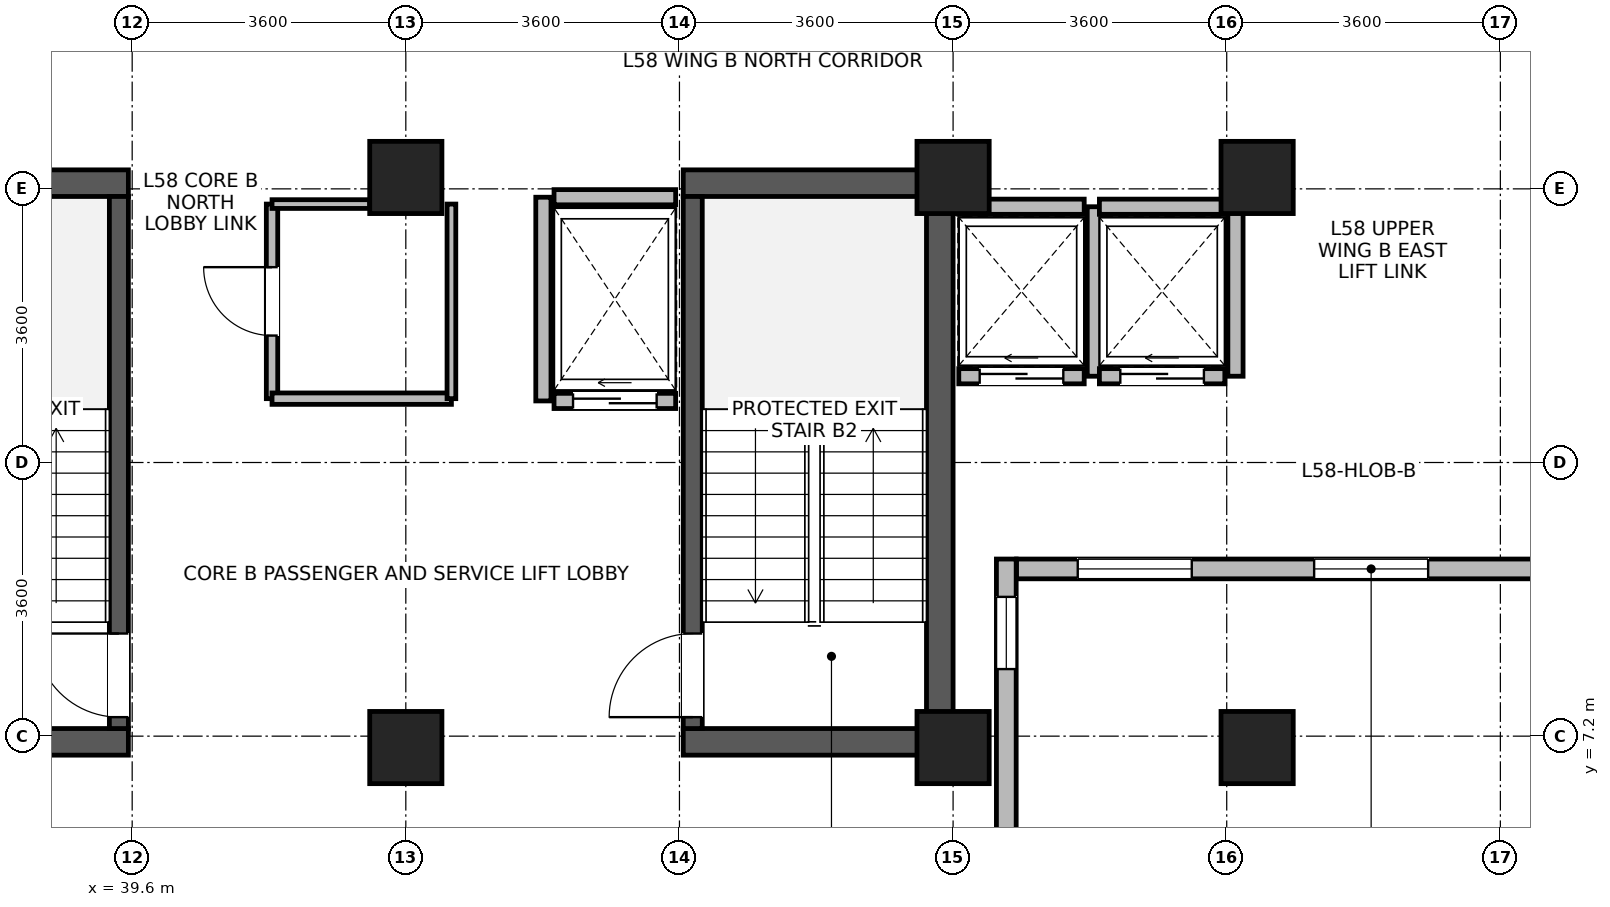
"""IFC4 building model, lengths in metres.
Left out: names, types, materials, properties, quantities, classifications, styles, units other than length and angle.
Written with IfcOpenShell. Run it as: python <this file> out.ifc"""

import sys

from ifc_helpers import new_model, si_unit, direction, frame, frame_2d, origin, origin_2d, place, context, subcontext, project, spatial, rectangle, extrude, source, transform, mapped, element, fill, save


model = new_model("IFC4")
c1 = context("Model", 3, precision=1e-05, world=origin(), true_north=direction((0.0, 1.0)))
c2 = subcontext(c1, "Body", "Model", "MODEL_VIEW")
j1 = project(units=[si_unit("LENGTHUNIT", "METRE"), si_unit("PLANEANGLEUNIT", "RADIAN")], contexts=[c1])
p1 = place(None, origin())
s1 = spatial("IfcSite", under=j1, at=p1, CompositionType="ELEMENT")
p2 = place(p1, origin())
s2 = spatial("IfcBuilding", under=s1, at=p2, CompositionType="ELEMENT")
p3 = place(p2, frame((0.0, 0.0, 227.7)))
s3 = spatial("IfcBuildingStorey", under=s2, at=p3, CompositionType="ELEMENT", Elevation=227.7)
p4 = place(p3, frame((50.225, 6.95, 0.0), z_axis=(0.0, 0.0, 1.0), x_axis=(0.0, 1.0, 0.0)))
e1 = element("IfcWall", 1, at=p4, inside=s3, PredefinedType="SHEAR", context=c2, shape_type="SweptSolid", body=[
    extrude(rectangle(XDim=7.7, YDim=0.35, at=frame_2d((3.85, 0.0))), origin(), (0.0, 0.0, 1.0), 3.47),
])
for number, where, z_axis, x_axis in (
    (2, (36.35, 7.125, 0.0), (0.0, 0.0, 1.0), (1.0, 0.0, 0.0)),
    (3, (46.85, 7.125, 0.0), (0.0, 0.0, 1.0), (1.0, 0.0, 0.0)),
    (4, (36.35, 14.475, 0.0), (0.0, 0.0, 1.0), (1.0, 0.0, 0.0)),
    (5, (46.85, 14.475, 0.0), (0.0, 0.0, 1.0), (1.0, 0.0, 0.0)),
):
    element("IfcWall", number, at=place(p3, frame(where, z_axis=z_axis, x_axis=x_axis)), inside=s3, PredefinedType="SHEAR", context=c2, shape_type="SweptSolid", body=[
        extrude(rectangle(XDim=3.2, YDim=0.35, at=frame_2d((1.6, 0.0))), origin(), (0.0, 0.0, 1.0), 3.47),
    ])
p5 = place(p3, frame((39.425, 7.3, 0.0), z_axis=(0.0, 0.0, 1.0), x_axis=(0.0, 1.0, 0.0)))
e6 = element("IfcWall", 6, at=p5, inside=s3, PredefinedType="SHEAR", context=c2, shape_type="SweptSolid", body=[
    extrude(rectangle(XDim=7.0, YDim=0.25, at=frame_2d((3.5, 0.0))), origin(), (0.0, 0.0, 1.0), 3.47),
])
p6 = place(p5, frame((0.15, 0.0, 0.0)))
e7 = element("IfcOpeningElement", 7, at=p6, cuts=e6, PredefinedType="OPENING", context=c2, shape_type="SweptSolid", body=[
    extrude(rectangle(XDim=1.1, YDim=2.08, at=frame_2d((0.55, 1.04))), frame((0.0, 0.135, 0.0), z_axis=(0.0, -1.0, 0.0), x_axis=(1.0, 0.0, 0.0)), (0.0, 0.0, 1.0), 0.27),
])
p7 = place(p3, frame((46.975, 7.3, 0.0), z_axis=(0.0, 0.0, 1.0), x_axis=(0.0, 1.0, 0.0)))
e8 = element("IfcWall", 8, at=p7, inside=s3, PredefinedType="SHEAR", context=c2, shape_type="SweptSolid", body=[
    extrude(rectangle(XDim=7.0, YDim=0.25, at=frame_2d((3.5, 0.0))), origin(), (0.0, 0.0, 1.0), 3.47),
])
p8 = place(p7, frame((0.15, 0.0, 0.0)))
e9 = element("IfcOpeningElement", 9, at=p8, cuts=e8, PredefinedType="OPENING", context=c2, shape_type="SweptSolid", body=[
    extrude(rectangle(XDim=1.1, YDim=2.08, at=frame_2d((0.55, 1.04))), frame((0.0, 0.135, 0.0), z_axis=(0.0, -1.0, 0.0), x_axis=(1.0, 0.0, 0.0)), (0.0, 0.0, 1.0), 0.27),
])
m1 = source(origin(), c2, "Body", "SweptSolid", [
    extrude(rectangle(XDim=0.95, YDim=0.95, at=origin_2d()), origin(), (0.0, 0.0, 1.0), 3.7),
])
for number, where, z_axis, x_axis in (
    (10, (43.2, 7.05, 0.0), (0.0, 0.0, 1.0), (1.0, 0.0, 0.0)),
    (11, (43.2, 14.55, 0.0), (0.0, 0.0, 1.0), (1.0, 0.0, 0.0)),
    (12, (50.4, 7.05, 0.0), (0.0, 0.0, 1.0), (1.0, 0.0, 0.0)),
    (13, (50.4, 14.55, 0.0), (0.0, 0.0, 1.0), (1.0, 0.0, 0.0)),
    (14, (54.4, 7.05, 0.0), (0.0, 0.0, 1.0), (1.0, 0.0, 0.0)),
    (15, (54.4, 14.55, 0.0), (0.0, 0.0, 1.0), (1.0, 0.0, 0.0)),
):
    element("IfcColumn", number, at=place(p3, frame(where, z_axis=z_axis, x_axis=x_axis)), inside=s3, PredefinedType="COLUMN", context=c2, shape_type="MappedRepresentation", body=[
        mapped(m1, transform((0.0, 0.0, 0.0), x_axis=(1.0, 0.0, 0.0), y_axis=(0.0, 1.0, 0.0), z_axis=(0.0, 0.0, 1.0), scale=1.0)),
    ])
p9 = place(p3, frame((51.1, 9.53, 0.0), z_axis=(0.0, 0.0, 1.0), x_axis=(0.0, -1.0, 0.0)))
e16 = element("IfcWall", 16, at=p9, inside=s3, PredefinedType="STANDARD", context=c2, shape_type="SweptSolid", body=[
    extrude(rectangle(XDim=3.86, YDim=0.26, at=frame_2d((1.93, 0.0))), origin(), (0.0, 0.0, 1.0), 3.45),
])
p10 = place(p9, frame((0.498, 0.0, 0.85)))
e17 = element("IfcOpeningElement", 17, at=p10, cuts=e16, PredefinedType="OPENING", context=c2, shape_type="SweptSolid", body=[
    extrude(rectangle(XDim=0.95, YDim=1.75, at=frame_2d((0.475, 0.875))), frame((0.0, 0.14, 0.0), z_axis=(0.0, -1.0, 0.0), x_axis=(1.0, 0.0, 0.0)), (0.0, 0.0, 1.0), 0.28),
])
p11 = place(p3, frame((60.565, 9.4, 0.0), z_axis=(0.0, 0.0, 1.0), x_axis=(-1.0, 0.0, 0.0)))
e18 = element("IfcWall", 18, at=p11, inside=s3, PredefinedType="STANDARD", context=c2, shape_type="SweptSolid", body=[
    extrude(rectangle(XDim=9.33, YDim=0.26, at=frame_2d((4.665, 0.0))), origin(), (0.0, 0.0, 1.0), 3.45),
])
p12 = place(p11, frame((0.805, 0.0, 0.85)))
e19 = element("IfcOpeningElement", 19, at=p12, cuts=e18, PredefinedType="OPENING", context=c2, shape_type="SweptSolid", body=[
    extrude(rectangle(XDim=1.5, YDim=1.85, at=frame_2d((0.75, 0.925))), frame((0.0, 0.14, 0.0), z_axis=(0.0, -1.0, 0.0), x_axis=(1.0, 0.0, 0.0)), (0.0, 0.0, 1.0), 0.28),
])
p13 = place(p11, frame((3.915, 0.0, 0.85)))
e20 = element("IfcOpeningElement", 20, at=p13, cuts=e18, PredefinedType="OPENING", context=c2, shape_type="SweptSolid", body=[
    extrude(rectangle(XDim=1.5, YDim=1.85, at=frame_2d((0.75, 0.925))), frame((0.0, 0.14, 0.0), z_axis=(0.0, -1.0, 0.0), x_axis=(1.0, 0.0, 0.0)), (0.0, 0.0, 1.0), 0.28),
])
p14 = place(p11, frame((7.025, 0.0, 0.85)))
e21 = element("IfcOpeningElement", 21, at=p14, cuts=e18, PredefinedType="OPENING", context=c2, shape_type="SweptSolid", body=[
    extrude(rectangle(XDim=1.5, YDim=1.85, at=frame_2d((0.75, 0.925))), frame((0.0, 0.14, 0.0), z_axis=(0.0, -1.0, 0.0), x_axis=(1.0, 0.0, 0.0)), (0.0, 0.0, 1.0), 0.28),
])
p15 = place(p3, frame((50.475, 11.935, 0.0), z_axis=(0.0, 0.0, 1.0), x_axis=(1.0, 0.0, 0.0)))
e22 = element("IfcWall", 22, at=p15, inside=s3, PredefinedType="PARTITIONING", context=c2, shape_type="SweptSolid", body=[
    extrude(rectangle(XDim=1.65, YDim=0.2, at=frame_2d((0.825, 0.0))), origin(), (0.0, 0.0, 1.0), 3.45),
])
p16 = place(p15, frame((0.275, 0.0, 0.0)))
e23 = element("IfcOpeningElement", 23, at=p16, cuts=e22, PredefinedType="OPENING", context=c2, shape_type="SweptSolid", body=[
    extrude(rectangle(XDim=1.1, YDim=2.12, at=frame_2d((0.55, 1.06))), frame((0.0, 0.11, 0.0), z_axis=(0.0, -1.0, 0.0), x_axis=(1.0, 0.0, 0.0)), (0.0, 0.0, 1.0), 0.22),
])
p17 = place(p3, frame((50.475, 14.165, 0.0), z_axis=(0.0, 0.0, 1.0), x_axis=(1.0, 0.0, 0.0)))
e24 = element("IfcWall", 24, at=p17, inside=s3, PredefinedType="PARTITIONING", context=c2, shape_type="SweptSolid", body=[
    extrude(rectangle(XDim=1.65, YDim=0.2, at=frame_2d((0.825, 0.0))), origin(), (0.0, 0.0, 1.0), 3.45),
])
p18 = place(p3, frame((52.265, 11.935, 0.0), z_axis=(0.0, 0.0, 1.0), x_axis=(0.0, 1.0, 0.0)))
e25 = element("IfcWall", 25, at=p18, inside=s3, PredefinedType="PARTITIONING", context=c2, shape_type="SweptSolid", body=[
    extrude(rectangle(XDim=2.23, YDim=0.2, at=frame_2d((1.115, 0.0))), origin(), (0.0, 0.0, 1.0), 3.45),
])
p19 = place(p3, frame((52.325, 11.935, 0.0), z_axis=(0.0, 0.0, 1.0), x_axis=(1.0, 0.0, 0.0)))
e26 = element("IfcWall", 26, at=p19, inside=s3, PredefinedType="PARTITIONING", context=c2, shape_type="SweptSolid", body=[
    extrude(rectangle(XDim=1.65, YDim=0.2, at=frame_2d((0.825, 0.0))), origin(), (0.0, 0.0, 1.0), 3.45),
])
p20 = place(p19, frame((0.275, 0.0, 0.0)))
e27 = element("IfcOpeningElement", 27, at=p20, cuts=e26, PredefinedType="OPENING", context=c2, shape_type="SweptSolid", body=[
    extrude(rectangle(XDim=1.1, YDim=2.12, at=frame_2d((0.55, 1.06))), frame((0.0, 0.11, 0.0), z_axis=(0.0, -1.0, 0.0), x_axis=(1.0, 0.0, 0.0)), (0.0, 0.0, 1.0), 0.22),
])
p21 = place(p3, frame((52.325, 14.165, 0.0), z_axis=(0.0, 0.0, 1.0), x_axis=(1.0, 0.0, 0.0)))
e28 = element("IfcWall", 28, at=p21, inside=s3, PredefinedType="PARTITIONING", context=c2, shape_type="SweptSolid", body=[
    extrude(rectangle(XDim=1.65, YDim=0.2, at=frame_2d((0.825, 0.0))), origin(), (0.0, 0.0, 1.0), 3.45),
])
p22 = place(p3, frame((54.115, 11.935, 0.0), z_axis=(0.0, 0.0, 1.0), x_axis=(0.0, 1.0, 0.0)))
e29 = element("IfcWall", 29, at=p22, inside=s3, PredefinedType="PARTITIONING", context=c2, shape_type="SweptSolid", body=[
    extrude(rectangle(XDim=2.23, YDim=0.2, at=frame_2d((1.115, 0.0))), origin(), (0.0, 0.0, 1.0), 3.45),
])
p23 = place(p3, frame((45.15, 11.61, 0.0), z_axis=(0.0, 0.0, 1.0), x_axis=(1.0, 0.0, 0.0)))
e30 = element("IfcWall", 30, at=p23, inside=s3, PredefinedType="PARTITIONING", context=c2, shape_type="SweptSolid", body=[
    extrude(rectangle(XDim=1.6, YDim=0.2, at=frame_2d((0.8, 0.0))), origin(), (0.0, 0.0, 1.0), 3.45),
])
p24 = place(p23, frame((0.25, 0.0, 0.0)))
e31 = element("IfcOpeningElement", 31, at=p24, cuts=e30, PredefinedType="OPENING", context=c2, shape_type="SweptSolid", body=[
    extrude(rectangle(XDim=1.1, YDim=2.12, at=frame_2d((0.55, 1.06))), frame((0.0, 0.11, 0.0), z_axis=(0.0, -1.0, 0.0), x_axis=(1.0, 0.0, 0.0)), (0.0, 0.0, 1.0), 0.22),
])
p25 = place(p3, frame((45.15, 14.29, 0.0), z_axis=(0.0, 0.0, 1.0), x_axis=(1.0, 0.0, 0.0)))
e32 = element("IfcWall", 32, at=p25, inside=s3, PredefinedType="PARTITIONING", context=c2, shape_type="SweptSolid", body=[
    extrude(rectangle(XDim=1.6, YDim=0.2, at=frame_2d((0.8, 0.0))), origin(), (0.0, 0.0, 1.0), 2.55),
])
p26 = place(p3, frame((45.01, 11.61, 0.0), z_axis=(0.0, 0.0, 1.0), x_axis=(0.0, 1.0, 0.0)))
e33 = element("IfcWall", 33, at=p26, inside=s3, PredefinedType="PARTITIONING", context=c2, shape_type="SweptSolid", body=[
    extrude(rectangle(XDim=2.68, YDim=0.2, at=frame_2d((1.34, 0.0))), origin(), (0.0, 0.0, 1.0), 3.45),
])
p27 = place(p3, frame((41.44, 11.64, 0.0), z_axis=(0.0, 0.0, 1.0), x_axis=(0.0, 1.0, 0.0)))
e34 = element("IfcWall", 34, at=p27, inside=s3, PredefinedType="PARTITIONING", context=c2, shape_type="SweptSolid", body=[
    extrude(rectangle(XDim=2.56, YDim=0.15, at=frame_2d((1.28, 0.0))), origin(), (0.0, 0.0, 1.0), 3.45),
])
p28 = place(p27, frame((0.83, 0.0, 0.0)))
e35 = element("IfcOpeningElement", 35, at=p28, cuts=e34, PredefinedType="OPENING", context=c2, shape_type="SweptSolid", body=[
    extrude(rectangle(XDim=0.9, YDim=2.08, at=frame_2d((0.45, 1.04))), frame((0.0, 0.085, 0.0), z_axis=(0.0, -1.0, 0.0), x_axis=(1.0, 0.0, 0.0)), (0.0, 0.0, 1.0), 0.17),
])
p29 = place(p3, frame((41.44, 11.64, 0.0), z_axis=(0.0, 0.0, 1.0), x_axis=(1.0, 0.0, 0.0)))
e36 = element("IfcWall", 36, at=p29, inside=s3, PredefinedType="PARTITIONING", context=c2, shape_type="SweptSolid", body=[
    extrude(rectangle(XDim=2.36, YDim=0.15, at=frame_2d((1.18, 0.0))), origin(), (0.0, 0.0, 1.0), 3.45),
])
p30 = place(p3, frame((43.8, 11.64, 0.0), z_axis=(0.0, 0.0, 1.0), x_axis=(0.0, 1.0, 0.0)))
e37 = element("IfcWall", 37, at=p30, inside=s3, PredefinedType="PARTITIONING", context=c2, shape_type="SweptSolid", body=[
    extrude(rectangle(XDim=2.56, YDim=0.115, at=frame_2d((1.28, 0.0))), origin(), (0.0, 0.0, 1.0), 3.45),
])
p31 = place(p3, frame((41.44, 14.2, 0.0), z_axis=(0.0, 0.0, 1.0), x_axis=(1.0, 0.0, 0.0)))
e38 = element("IfcWall", 38, at=p31, inside=s3, PredefinedType="PARTITIONING", context=c2, shape_type="SweptSolid", body=[
    extrude(rectangle(XDim=1.285, YDim=0.115, at=frame_2d((0.643, 0.0))), origin(), (0.0, 0.0, 1.0), 2.55),
])
p32 = place(p10, origin())
e39 = element("IfcWindow", 39, at=p32, inside=s3, PartitioningType="SINGLE_PANEL", PredefinedType="WINDOW", context=c2, shape_type="SweptSolid", body=[
    extrude(rectangle(XDim=0.95, YDim=1.75, at=frame_2d((0.475, 0.875))), frame((0.0, 0.03, 0.0), z_axis=(0.0, -1.0, 0.0), x_axis=(1.0, 0.0, 0.0)), (0.0, 0.0, 1.0), 0.06),
])
fill(e17, e39)
p33 = place(p13, origin())
e40 = element("IfcWindow", 40, at=p33, inside=s3, PartitioningType="SINGLE_PANEL", PredefinedType="WINDOW", context=c2, shape_type="SweptSolid", body=[
    extrude(rectangle(XDim=1.5, YDim=1.85, at=frame_2d((0.75, 0.925))), frame((0.0, 0.03, 0.0), z_axis=(0.0, -1.0, 0.0), x_axis=(1.0, 0.0, 0.0)), (0.0, 0.0, 1.0), 0.06),
])
fill(e20, e40)
p34 = place(p14, origin())
e41 = element("IfcWindow", 41, at=p34, inside=s3, PartitioningType="SINGLE_PANEL", PredefinedType="WINDOW", context=c2, shape_type="SweptSolid", body=[
    extrude(rectangle(XDim=1.5, YDim=1.85, at=frame_2d((0.75, 0.925))), frame((0.0, 0.03, 0.0), z_axis=(0.0, -1.0, 0.0), x_axis=(1.0, 0.0, 0.0)), (0.0, 0.0, 1.0), 0.06),
])
fill(e21, e41)
p35 = place(p6, origin())
e42 = element("IfcDoor", 42, at=p35, inside=s3, OperationType="SINGLE_SWING_RIGHT", PredefinedType="DOOR", context=c2, shape_type="SweptSolid", body=[
    extrude(rectangle(XDim=1.1, YDim=2.08, at=frame_2d((0.55, 1.04))), frame((0.0, 0.025, 0.0), z_axis=(0.0, -1.0, 0.0), x_axis=(1.0, 0.0, 0.0)), (0.0, 0.0, 1.0), 0.05),
])
fill(e7, e42)
p36 = place(p8, origin())
e43 = element("IfcDoor", 43, at=p36, inside=s3, OperationType="SINGLE_SWING_LEFT", PredefinedType="DOOR", context=c2, shape_type="SweptSolid", body=[
    extrude(rectangle(XDim=1.1, YDim=2.08, at=frame_2d((0.55, 1.04))), frame((0.0, 0.025, 0.0), z_axis=(0.0, -1.0, 0.0), x_axis=(1.0, 0.0, 0.0)), (0.0, 0.0, 1.0), 0.05),
])
fill(e9, e43)
p37 = place(p16, origin())
e44 = element("IfcDoor", 44, at=p37, inside=s3, OperationType="SLIDING_TO_LEFT", PredefinedType="DOOR", context=c2, shape_type="SweptSolid", body=[
    extrude(rectangle(XDim=1.1, YDim=2.12, at=frame_2d((0.55, 1.06))), frame((0.0, 0.025, 0.0), z_axis=(0.0, -1.0, 0.0), x_axis=(1.0, 0.0, 0.0)), (0.0, 0.0, 1.0), 0.05),
])
fill(e23, e44)
p38 = place(p20, origin())
e45 = element("IfcDoor", 45, at=p38, inside=s3, OperationType="SLIDING_TO_LEFT", PredefinedType="DOOR", context=c2, shape_type="SweptSolid", body=[
    extrude(rectangle(XDim=1.1, YDim=2.12, at=frame_2d((0.55, 1.06))), frame((0.0, 0.025, 0.0), z_axis=(0.0, -1.0, 0.0), x_axis=(1.0, 0.0, 0.0)), (0.0, 0.0, 1.0), 0.05),
])
fill(e27, e45)
p39 = place(p24, origin())
e46 = element("IfcDoor", 46, at=p39, inside=s3, OperationType="SLIDING_TO_LEFT", PredefinedType="DOOR", context=c2, shape_type="SweptSolid", body=[
    extrude(rectangle(XDim=1.1, YDim=2.12, at=frame_2d((0.55, 1.06))), frame((0.0, 0.025, 0.0), z_axis=(0.0, -1.0, 0.0), x_axis=(1.0, 0.0, 0.0)), (0.0, 0.0, 1.0), 0.05),
])
fill(e31, e46)
p40 = place(p28, origin())
e47 = element("IfcDoor", 47, at=p40, inside=s3, OperationType="SINGLE_SWING_RIGHT", PredefinedType="DOOR", context=c2, shape_type="SweptSolid", body=[
    extrude(rectangle(XDim=0.9, YDim=2.08, at=frame_2d((0.45, 1.04))), frame((0.0, 0.025, 0.0), z_axis=(0.0, -1.0, 0.0), x_axis=(1.0, 0.0, 0.0)), (0.0, 0.0, 1.0), 0.05),
])
fill(e35, e47)
save(model, sys.argv[1])
